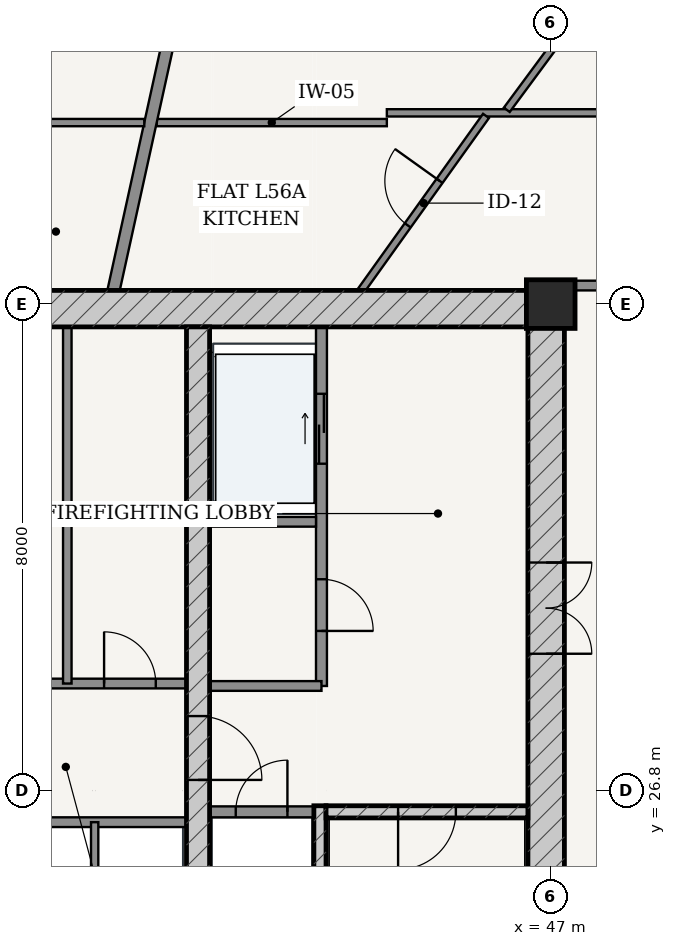
"""IFC4 building model, lengths in metres.
Left out: names, types, materials, properties, quantities, classifications, styles, units other than length and angle.
Written with IfcOpenShell. Run it as: python <this file> out.ifc"""

import sys

from ifc_helpers import new_model, si_unit, direction, frame, frame_2d, origin, origin_2d, place, context, subcontext, project, spatial, rectangle, extrude, source, transform, mapped, element, fill, save


model = new_model("IFC4")
c1 = context("Model", 3, precision=1e-05, world=origin(), true_north=direction((-0.2419218956, 0.970295726276)))
c2 = subcontext(c1, "Body", "Model", "MODEL_VIEW")
j1 = project(units=[si_unit("LENGTHUNIT", "METRE"), si_unit("PLANEANGLEUNIT", "RADIAN")], contexts=[c1])
p1 = place(None, origin())
s1 = spatial("IfcSite", under=j1, at=p1, CompositionType="ELEMENT")
p2 = place(p1, origin())
s2 = spatial("IfcBuilding", under=s1, at=p2, CompositionType="ELEMENT")
p3 = place(p2, frame((0.0, 0.0, 213.4)))
s3 = spatial("IfcBuildingStorey", under=s2, at=p3, CompositionType="ELEMENT", Elevation=213.4)
p4 = place(p3, frame((47.0, 34.8, 0.0), z_axis=(0.0, 0.0, 1.0), x_axis=(1.0, 0.0, 0.0)))
e1 = element("IfcColumn", 1, at=p4, inside=s3, PredefinedType="COLUMN", context=c2, shape_type="SweptSolid", body=[
    extrude(rectangle(XDim=0.8, YDim=0.8, at=origin_2d()), origin(), (0.0, 0.0, 1.0), 3.7),
])
p5 = place(p3, frame((28.775, 34.725, 0.0), z_axis=(0.0, 0.0, 1.0), x_axis=(1.0, 0.0, 0.0)))
e2 = element("IfcWall", 2, at=p5, inside=s3, PredefinedType="SHEAR", context=c2, shape_type="SweptSolid", body=[
    extrude(rectangle(XDim=18.45, YDim=0.6, at=frame_2d((9.225, 0.0))), origin(), (0.0, 0.0, 1.0), 3.435),
])
p6 = place(p3, frame((46.925, 19.175, 0.0), z_axis=(0.0, 0.0, 1.0), x_axis=(0.0, 1.0, 0.0)))
e3 = element("IfcWall", 3, at=p6, inside=s3, PredefinedType="SHEAR", context=c2, shape_type="SweptSolid", body=[
    extrude(rectangle(XDim=15.25, YDim=0.6, at=frame_2d((7.625, 0.0))), origin(), (0.0, 0.0, 1.0), 3.435),
])
p7 = place(p6, frame((9.875, 0.0, 0.0)))
e4 = element("IfcOpeningElement", 4, at=p7, cuts=e3, PredefinedType="OPENING", context=c2, shape_type="SweptSolid", body=[
    extrude(rectangle(XDim=1.5, YDim=2.2, at=frame_2d((0.75, 1.1))), frame((0.0, 0.31, 0.0), z_axis=(0.0, -1.0, 0.0), x_axis=(1.0, 0.0, 0.0)), (0.0, 0.0, 1.0), 0.62),
])
p8 = place(p3, frame((43.205, 19.175, 0.0), z_axis=(0.0, 0.0, 1.0), x_axis=(0.0, 1.0, 0.0)))
e5 = element("IfcWall", 5, at=p8, inside=s3, PredefinedType="SOLIDWALL", context=c2, shape_type="SweptSolid", body=[
    extrude(rectangle(XDim=7.375, YDim=0.2, at=frame_2d((3.688, 0.0))), origin(), (0.0, 0.0, 1.0), 3.435),
])
p9 = place(p3, frame((43.305, 26.45, 0.0), z_axis=(0.0, 0.0, 1.0), x_axis=(1.0, 0.0, 0.0)))
e6 = element("IfcWall", 6, at=p9, inside=s3, PredefinedType="SOLIDWALL", context=c2, shape_type="SweptSolid", body=[
    extrude(rectangle(XDim=3.32, YDim=0.2, at=frame_2d((1.66, 0.0))), origin(), (0.0, 0.0, 1.0), 3.435),
])
p10 = place(p9, frame((1.185, 0.0, 0.0)))
e7 = element("IfcOpeningElement", 7, at=p10, cuts=e6, PredefinedType="OPENING", context=c2, shape_type="SweptSolid", body=[
    extrude(rectangle(XDim=0.95, YDim=2.15, at=frame_2d((0.475, 1.075))), frame((0.0, 0.11, 0.0), z_axis=(0.0, -1.0, 0.0), x_axis=(1.0, 0.0, 0.0)), (0.0, 0.0, 1.0), 0.22),
])
p11 = place(p3, frame((41.2, 19.175, 0.0), z_axis=(0.0, 0.0, 1.0), x_axis=(0.0, 1.0, 0.0)))
e8 = element("IfcWall", 8, at=p11, inside=s3, PredefinedType="SHEAR", context=c2, shape_type="SweptSolid", body=[
    extrude(rectangle(XDim=15.25, YDim=0.38, at=frame_2d((7.625, 0.0))), origin(), (0.0, 0.0, 1.0), 3.435),
])
p12 = place(p11, frame((7.8, 0.0, 0.0)))
e9 = element("IfcOpeningElement", 9, at=p12, cuts=e8, PredefinedType="OPENING", context=c2, shape_type="SweptSolid", body=[
    extrude(rectangle(XDim=1.05, YDim=2.15, at=frame_2d((0.525, 1.075))), frame((0.0, 0.2, 0.0), z_axis=(0.0, -1.0, 0.0), x_axis=(1.0, 0.0, 0.0)), (0.0, 0.0, 1.0), 0.4),
])
p13 = place(p3, frame((41.39, 26.45, 0.0), z_axis=(0.0, 0.0, 1.0), x_axis=(1.0, 0.0, 0.0)))
e10 = element("IfcWall", 10, at=p13, inside=s3, PredefinedType="PARTITIONING", context=c2, shape_type="SweptSolid", body=[
    extrude(rectangle(XDim=1.71, YDim=0.18, at=frame_2d((0.855, 0.0))), origin(), (0.0, 0.0, 1.0), 3.435),
])
p14 = place(p13, frame((0.43, 0.0, 0.0)))
e11 = element("IfcOpeningElement", 11, at=p14, cuts=e10, PredefinedType="OPENING", context=c2, shape_type="SweptSolid", body=[
    extrude(rectangle(XDim=0.85, YDim=2.1, at=frame_2d((0.425, 1.05))), frame((0.0, 0.1, 0.0), z_axis=(0.0, -1.0, 0.0), x_axis=(1.0, 0.0, 0.0)), (0.0, 0.0, 1.0), 0.2),
])
p15 = place(p3, frame((43.23, 28.52, 0.0), z_axis=(0.0, 0.0, 1.0), x_axis=(0.0, 1.0, 0.0)))
e12 = element("IfcWall", 12, at=p15, inside=s3, PredefinedType="PARTITIONING", context=c2, shape_type="SweptSolid", body=[
    extrude(rectangle(XDim=5.905, YDim=0.18, at=frame_2d((2.953, 0.0))), origin(), (0.0, 0.0, 1.0), 3.435),
])
p16 = place(p15, frame((0.905, 0.0, 0.0)))
e13 = element("IfcOpeningElement", 13, at=p16, cuts=e12, PredefinedType="OPENING", context=c2, shape_type="SweptSolid", body=[
    extrude(rectangle(XDim=0.85, YDim=2.1, at=frame_2d((0.425, 1.05))), frame((0.0, 0.1, 0.0), z_axis=(0.0, -1.0, 0.0), x_axis=(1.0, 0.0, 0.0)), (0.0, 0.0, 1.0), 0.2),
])
p17 = place(p15, frame((3.655, 0.0, 0.0)))
e14 = element("IfcOpeningElement", 14, at=p17, cuts=e12, PredefinedType="OPENING", context=c2, shape_type="SweptSolid", body=[
    extrude(rectangle(XDim=1.15, YDim=2.2, at=frame_2d((0.575, 1.1))), frame((0.0, 0.1, 0.0), z_axis=(0.0, -1.0, 0.0), x_axis=(1.0, 0.0, 0.0)), (0.0, 0.0, 1.0), 0.2),
])
p18 = place(p3, frame((41.39, 31.22, 0.0), z_axis=(0.0, 0.0, 1.0), x_axis=(1.0, 0.0, 0.0)))
e15 = element("IfcWall", 15, at=p18, inside=s3, PredefinedType="PARTITIONING", context=c2, shape_type="SweptSolid", body=[
    extrude(rectangle(XDim=1.75, YDim=0.16, at=frame_2d((0.875, 0.0))), origin(), (0.0, 0.0, 1.0), 3.435),
])
p19 = place(p3, frame((41.39, 28.52, 0.0), z_axis=(0.0, 0.0, 1.0), x_axis=(1.0, 0.0, 0.0)))
e16 = element("IfcWall", 16, at=p19, inside=s3, PredefinedType="PARTITIONING", context=c2, shape_type="SweptSolid", body=[
    extrude(rectangle(XDim=1.84, YDim=0.16, at=frame_2d((0.92, 0.0))), origin(), (0.0, 0.0, 1.0), 3.435),
])
p20 = place(p3, frame((34.99, 28.56, 0.0), z_axis=(0.0, 0.0, 1.0), x_axis=(1.0, 0.0, 0.0)))
e17 = element("IfcWall", 17, at=p20, inside=s3, PredefinedType="PARTITIONING", context=c2, shape_type="SweptSolid", body=[
    extrude(rectangle(XDim=6.02, YDim=0.16, at=frame_2d((3.01, 0.0))), origin(), (0.0, 0.0, 1.0), 3.435),
])
p21 = place(p20, frame((0.505, 0.0, 0.0)))
e18 = element("IfcOpeningElement", 18, at=p21, cuts=e17, PredefinedType="OPENING", context=c2, shape_type="SweptSolid", body=[
    extrude(rectangle(XDim=0.85, YDim=2.1, at=frame_2d((0.425, 1.05))), frame((0.0, 0.09, 0.0), z_axis=(0.0, -1.0, 0.0), x_axis=(1.0, 0.0, 0.0)), (0.0, 0.0, 1.0), 0.18),
])
p22 = place(p20, frame((2.58, 0.0, 0.0)))
e19 = element("IfcOpeningElement", 19, at=p22, cuts=e17, PredefinedType="OPENING", context=c2, shape_type="SweptSolid", body=[
    extrude(rectangle(XDim=0.86, YDim=2.1, at=frame_2d((0.43, 1.05))), frame((0.0, 0.09, 0.0), z_axis=(0.0, -1.0, 0.0), x_axis=(1.0, 0.0, 0.0)), (0.0, 0.0, 1.0), 0.18),
])
p23 = place(p20, frame((4.665, 0.0, 0.0)))
e20 = element("IfcOpeningElement", 20, at=p23, cuts=e17, PredefinedType="OPENING", context=c2, shape_type="SweptSolid", body=[
    extrude(rectangle(XDim=0.85, YDim=2.1, at=frame_2d((0.425, 1.05))), frame((0.0, 0.09, 0.0), z_axis=(0.0, -1.0, 0.0), x_axis=(1.0, 0.0, 0.0)), (0.0, 0.0, 1.0), 0.18),
])
p24 = place(p3, frame((39.05, 28.56, 0.0), z_axis=(0.0, 0.0, 1.0), x_axis=(0.0, 1.0, 0.0)))
e21 = element("IfcWall", 21, at=p24, inside=s3, PredefinedType="PARTITIONING", context=c2, shape_type="SweptSolid", body=[
    extrude(rectangle(XDim=5.865, YDim=0.14, at=frame_2d((2.933, 0.0))), origin(), (0.0, 0.0, 1.0), 3.435),
])
p25 = place(p3, frame((34.99, 26.28, 0.0), z_axis=(0.0, 0.0, 1.0), x_axis=(1.0, 0.0, 0.0)))
e22 = element("IfcWall", 22, at=p25, inside=s3, PredefinedType="PARTITIONING", context=c2, shape_type="SweptSolid", body=[
    extrude(rectangle(XDim=6.02, YDim=0.16, at=frame_2d((3.01, 0.0))), origin(), (0.0, 0.0, 1.0), 3.435),
])
p26 = place(p25, frame((0.225, 0.0, 0.0)))
e23 = element("IfcOpeningElement", 23, at=p26, cuts=e22, PredefinedType="OPENING", context=c2, shape_type="SweptSolid", body=[
    extrude(rectangle(XDim=1.1, YDim=2.2, at=frame_2d((0.55, 1.1))), frame((0.0, 0.09, 0.0), z_axis=(0.0, -1.0, 0.0), x_axis=(1.0, 0.0, 0.0)), (0.0, 0.0, 1.0), 0.18),
])
p27 = place(p25, frame((1.705, 0.0, 0.0)))
e24 = element("IfcOpeningElement", 24, at=p27, cuts=e22, PredefinedType="OPENING", context=c2, shape_type="SweptSolid", body=[
    extrude(rectangle(XDim=1.1, YDim=2.2, at=frame_2d((0.55, 1.1))), frame((0.0, 0.09, 0.0), z_axis=(0.0, -1.0, 0.0), x_axis=(1.0, 0.0, 0.0)), (0.0, 0.0, 1.0), 0.18),
])
p28 = place(p3, frame((39.5, 23.72, 0.0), z_axis=(0.0, 0.0, 1.0), x_axis=(0.0, 1.0, 0.0)))
e25 = element("IfcWall", 25, at=p28, inside=s3, PredefinedType="PARTITIONING", context=c2, shape_type="SweptSolid", body=[
    extrude(rectangle(XDim=2.56, YDim=0.12, at=frame_2d((1.28, 0.0))), origin(), (0.0, 0.0, 1.0), 3.435),
])
p29 = place(p3, frame((47.225, 35.105, 0.0), z_axis=(0.0, 0.0, 1.0), x_axis=(1.0, 0.0, 0.0)))
e26 = element("IfcWall", 26, at=p29, inside=s3, PredefinedType="PARTITIONING", context=c2, shape_type="SweptSolid", body=[
    extrude(rectangle(XDim=1.93, YDim=0.16, at=frame_2d((0.965, 0.0))), origin(), (0.0, 0.0, 1.0), 3.435),
])
p30 = place(p3, frame((40.52, 37.785, 0.0), z_axis=(0.0, 0.0, 1.0), x_axis=(1.0, 0.0, 0.0)))
e27 = element("IfcWall", 27, at=p30, inside=s3, PredefinedType="PARTITIONING", context=c2, shape_type="SweptSolid", body=[
    extrude(rectangle(XDim=3.785, YDim=0.12, at=frame_2d((1.893, 0.0))), origin(), (0.0, 0.0, 1.0), 2.951),
])
p31 = place(p3, frame((44.305, 37.945, 0.0), z_axis=(0.0, 0.0, 1.0), x_axis=(1.0, 0.0, 0.0)))
e28 = element("IfcWall", 28, at=p31, inside=s3, PredefinedType="PARTITIONING", context=c2, shape_type="SweptSolid", body=[
    extrude(rectangle(XDim=7.69, YDim=0.12, at=frame_2d((3.845, 0.0))), origin(), (0.0, 0.0, 1.0), 2.951),
])
p32 = place(p31, frame((3.591, 0.0, 0.0)))
e29 = element("IfcOpeningElement", 29, at=p32, cuts=e28, PredefinedType="OPENING", context=c2, shape_type="SweptSolid", body=[
    extrude(rectangle(XDim=0.9, YDim=2.15, at=frame_2d((0.45, 1.075))), frame((0.0, 0.07, 0.0), z_axis=(0.0, -1.0, 0.0), x_axis=(1.0, 0.0, 0.0)), (0.0, 0.0, 1.0), 0.14),
])
p33 = place(p3, frame((46.278, 37.995, 0.0), z_axis=(0.0, 0.0, 1.0), x_axis=(0.594518724985, 0.80408176552, 0.0)))
e30 = element("IfcWall", 30, at=p33, inside=s3, PredefinedType="PARTITIONING", context=c2, shape_type="SweptSolid", body=[
    extrude(rectangle(XDim=6.344, YDim=0.12, at=frame_2d((3.172, 0.0))), origin(), (0.0, 0.0, 1.0), 2.951),
])
p34 = place(p33, frame((1.715, 0.0, 0.0)))
e31 = element("IfcOpeningElement", 31, at=p34, cuts=e30, PredefinedType="OPENING", context=c2, shape_type="SweptSolid", body=[
    extrude(rectangle(XDim=0.9, YDim=2.15, at=frame_2d((0.45, 1.075))), frame((0.0, 0.07, 0.0), z_axis=(0.0, -1.0, 0.0), x_axis=(1.0, 0.0, 0.0)), (0.0, 0.0, 1.0), 0.14),
])
p35 = place(p3, frame((43.885, 35.027, 0.0), z_axis=(0.0, 0.0, 1.0), x_axis=(0.581801309538, 0.813330951225, 0.0)))
e32 = element("IfcWall", 32, at=p35, inside=s3, PredefinedType="PARTITIONING", context=c2, shape_type="SweptSolid", body=[
    extrude(rectangle(XDim=3.526, YDim=0.12, at=frame_2d((1.763, 0.0))), origin(), (0.0, 0.0, 1.0), 3.435),
])
p36 = place(p35, frame((1.313, 0.0, 0.0)))
e33 = element("IfcOpeningElement", 33, at=p36, cuts=e32, PredefinedType="OPENING", context=c2, shape_type="SweptSolid", body=[
    extrude(rectangle(XDim=0.9, YDim=2.15, at=frame_2d((0.45, 1.075))), frame((0.0, 0.07, 0.0), z_axis=(0.0, -1.0, 0.0), x_axis=(1.0, 0.0, 0.0)), (0.0, 0.0, 1.0), 0.14),
])
p37 = place(p3, frame((39.811, 35.027, 0.0), z_axis=(0.0, 0.0, 1.0), x_axis=(0.214966857327, 0.976621344356, 0.0)))
e34 = element("IfcWall", 34, at=p37, inside=s3, PredefinedType="PARTITIONING", context=c2, shape_type="SweptSolid", body=[
    extrude(rectangle(XDim=11.258, YDim=0.2, at=frame_2d((5.629, 0.0))), origin(), (0.0, 0.0, 1.0), 2.52),
])
p38 = place(p3, frame((31.695, 37.785, 0.0), z_axis=(0.0, 0.0, 1.0), x_axis=(1.0, 0.0, 0.0)))
e35 = element("IfcWall", 35, at=p38, inside=s3, PredefinedType="PARTITIONING", context=c2, shape_type="SweptSolid", body=[
    extrude(rectangle(XDim=8.621, YDim=0.12, at=frame_2d((4.311, 0.0))), origin(), (0.0, 0.0, 1.0), 2.951),
])
p39 = place(p38, frame((1.716, 0.0, 0.0)))
e36 = element("IfcOpeningElement", 36, at=p39, cuts=e35, PredefinedType="OPENING", context=c2, shape_type="SweptSolid", body=[
    extrude(rectangle(XDim=0.9, YDim=2.15, at=frame_2d((0.45, 1.075))), frame((0.0, 0.07, 0.0), z_axis=(0.0, -1.0, 0.0), x_axis=(1.0, 0.0, 0.0)), (0.0, 0.0, 1.0), 0.14),
])
p40 = place(p38, frame((5.784, 0.0, 0.0)))
e37 = element("IfcOpeningElement", 37, at=p40, cuts=e35, PredefinedType="OPENING", context=c2, shape_type="SweptSolid", body=[
    extrude(rectangle(XDim=0.9, YDim=2.15, at=frame_2d((0.45, 1.075))), frame((0.0, 0.07, 0.0), z_axis=(0.0, -1.0, 0.0), x_axis=(1.0, 0.0, 0.0)), (0.0, 0.0, 1.0), 0.14),
])
m1 = source(origin(), c2, "Body", "SweptSolid", [
    extrude(rectangle(XDim=1.5, YDim=2.2, at=frame_2d((0.75, 1.1))), frame((0.0, 0.025, 0.0), z_axis=(0.0, -1.0, 0.0), x_axis=(1.0, 0.0, 0.0)), (0.0, 0.0, 1.0), 0.05),
])
p41 = place(p7, frame((1.5, 0.0, 0.0), z_axis=(0.0, 0.0, 1.0), x_axis=(-1.0, 0.0, 0.0)))
e38 = element("IfcDoor", 38, at=p41, inside=s3, OperationType="DOUBLE_DOOR_SINGLE_SWING", PredefinedType="DOOR", context=c2, shape_type="MappedRepresentation", body=[
    mapped(m1, transform((0.0, 0.0, 0.0), scale=1.0)),
])
fill(e4, e38)
m2 = source(origin(), c2, "Body", "SweptSolid", [
    extrude(rectangle(XDim=1.05, YDim=2.15, at=frame_2d((0.525, 1.075))), frame((0.0, 0.025, 0.0), z_axis=(0.0, -1.0, 0.0), x_axis=(1.0, 0.0, 0.0)), (0.0, 0.0, 1.0), 0.05),
])
p42 = place(p12, frame((1.05, 0.0, 0.0), z_axis=(0.0, 0.0, 1.0), x_axis=(-1.0, 0.0, 0.0)))
e39 = element("IfcDoor", 39, at=p42, inside=s3, OperationType="SINGLE_SWING_RIGHT", PredefinedType="DOOR", context=c2, shape_type="MappedRepresentation", body=[
    mapped(m2, transform((0.0, 0.0, 0.0), scale=1.0)),
])
fill(e9, e39)
m3 = source(origin(), c2, "Body", "SweptSolid", [
    extrude(rectangle(XDim=0.95, YDim=2.15, at=frame_2d((0.475, 1.075))), frame((0.0, 0.025, 0.0), z_axis=(0.0, -1.0, 0.0), x_axis=(1.0, 0.0, 0.0)), (0.0, 0.0, 1.0), 0.05),
])
p43 = place(p10, frame((0.95, 0.0, 0.0), z_axis=(0.0, 0.0, 1.0), x_axis=(-1.0, 0.0, 0.0)))
e40 = element("IfcDoor", 40, at=p43, inside=s3, OperationType="SINGLE_SWING_RIGHT", PredefinedType="DOOR", context=c2, shape_type="MappedRepresentation", body=[
    mapped(m3, transform((0.0, 0.0, 0.0), scale=1.0)),
])
fill(e7, e40)
m4 = source(origin(), c2, "Body", "SweptSolid", [
    extrude(rectangle(XDim=0.85, YDim=2.1, at=frame_2d((0.425, 1.05))), frame((0.0, 0.025, 0.0), z_axis=(0.0, -1.0, 0.0), x_axis=(1.0, 0.0, 0.0)), (0.0, 0.0, 1.0), 0.05),
])
p44 = place(p14, origin())
e41 = element("IfcDoor", 41, at=p44, inside=s3, OperationType="SINGLE_SWING_RIGHT", PredefinedType="DOOR", context=c2, shape_type="MappedRepresentation", body=[
    mapped(m4, transform((0.0, 0.0, 0.0), scale=1.0)),
])
fill(e11, e41)
p45 = place(p16, frame((0.85, 0.0, 0.0), z_axis=(0.0, 0.0, 1.0), x_axis=(-1.0, 0.0, 0.0)))
e42 = element("IfcDoor", 42, at=p45, inside=s3, OperationType="SINGLE_SWING_RIGHT", PredefinedType="DOOR", context=c2, shape_type="MappedRepresentation", body=[
    mapped(m4, transform((0.0, 0.0, 0.0), scale=1.0)),
])
fill(e13, e42)
p46 = place(p23, origin())
e43 = element("IfcDoor", 43, at=p46, inside=s3, OperationType="SINGLE_SWING_LEFT", PredefinedType="DOOR", context=c2, shape_type="MappedRepresentation", body=[
    mapped(m4, transform((0.0, 0.0, 0.0), scale=1.0)),
])
fill(e20, e43)
m5 = source(origin(), c2, "Body", "SweptSolid", [
    extrude(rectangle(XDim=1.15, YDim=2.2, at=frame_2d((0.575, 1.1))), frame((0.0, 0.025, 0.0), z_axis=(0.0, -1.0, 0.0), x_axis=(1.0, 0.0, 0.0)), (0.0, 0.0, 1.0), 0.05),
])
p47 = place(p17, origin())
e44 = element("IfcDoor", 44, at=p47, inside=s3, OperationType="DOUBLE_DOOR_SLIDING", PredefinedType="DOOR", context=c2, shape_type="MappedRepresentation", body=[
    mapped(m5, transform((0.0, 0.0, 0.0), scale=1.0)),
])
fill(e14, e44)
m6 = source(origin(), c2, "Body", "SweptSolid", [
    extrude(rectangle(XDim=0.9, YDim=2.15, at=frame_2d((0.45, 1.075))), frame((0.0, 0.025, 0.0), z_axis=(0.0, -1.0, 0.0), x_axis=(1.0, 0.0, 0.0)), (0.0, 0.0, 1.0), 0.05),
])
p48 = place(p36, origin())
e45 = element("IfcDoor", 45, at=p48, inside=s3, OperationType="SINGLE_SWING_RIGHT", PredefinedType="DOOR", context=c2, shape_type="MappedRepresentation", body=[
    mapped(m6, transform((0.0, 0.0, 0.0), scale=1.0)),
])
fill(e33, e45)
save(model, sys.argv[1])
